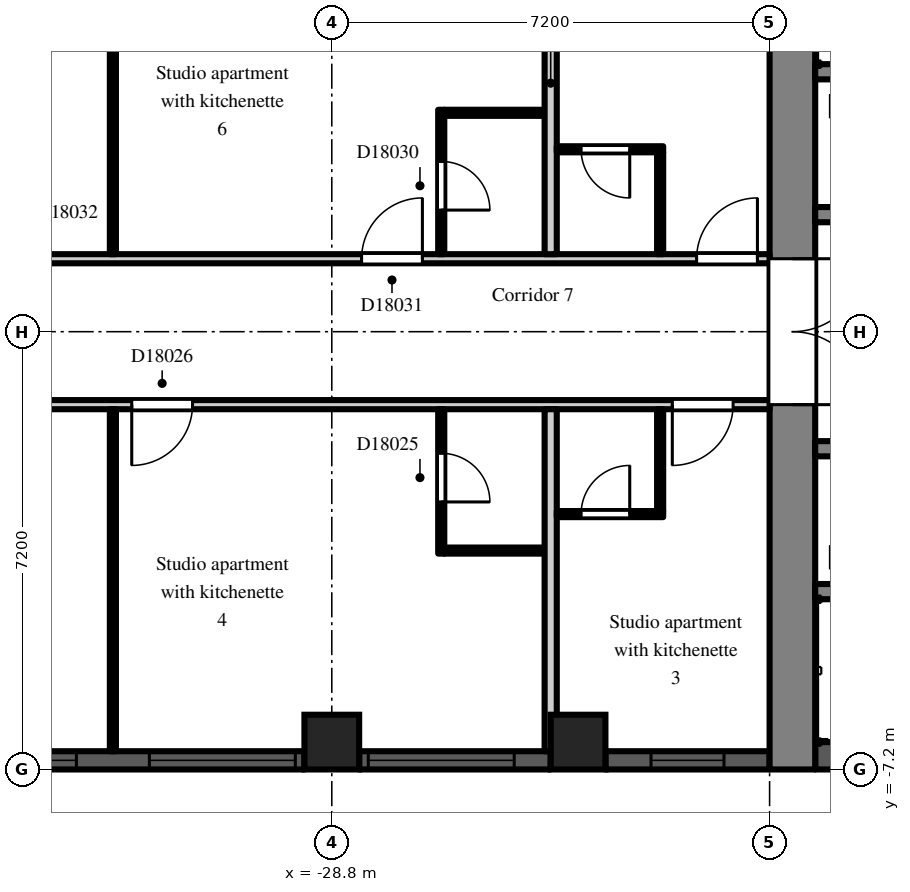
"""IFC4 building model, lengths in metres.
Left out: names, types, materials, properties, quantities, classifications, styles, units other than length and angle.
Written with IfcOpenShell. Run it as: python <this file> out.ifc"""

import sys

from ifc_helpers import new_model, si_unit, direction, frame, frame_2d, origin, origin_2d, place, context, subcontext, project, spatial, rectangle, extrude, element, fill, save


model = new_model("IFC4")
c1 = context("Model", 3, precision=1e-05, world=origin(), true_north=direction((0.0, 1.0)))
c2 = subcontext(c1, "Body", "Model", "MODEL_VIEW")
j1 = project(units=[si_unit("LENGTHUNIT", "METRE"), si_unit("PLANEANGLEUNIT", "RADIAN")], contexts=[c1])
p1 = place(None, origin())
s1 = spatial("IfcSite", under=j1, at=p1, CompositionType="ELEMENT")
p2 = place(p1, origin())
s2 = spatial("IfcBuilding", under=s1, at=p2, CompositionType="ELEMENT")
p3 = place(p2, frame((0.0, 0.0, 120.3)))
s3 = spatial("IfcBuildingStorey", under=s2, at=p3, CompositionType="ELEMENT", Elevation=120.3)
for number, where, z_axis, x_axis in (
    (1, (-28.8, -6.75, 0.0), (0.0, 0.0, 1.0), (1.0, 0.0, 0.0)),
    (2, (-24.75, -6.75, 0.0), (0.0, 0.0, 1.0), (1.0, 0.0, 0.0)),
):
    element("IfcColumn", number, at=place(p3, frame(where, z_axis=z_axis, x_axis=x_axis)), inside=s3, PredefinedType="COLUMN", context=c2, shape_type="SweptSolid", body=[
        extrude(rectangle(XDim=0.9, YDim=0.9, at=origin_2d()), origin(), (0.0, 0.0, 1.0), 3.0),
    ])
p4 = place(p3, frame((-35.55, -7.05, 0.0), z_axis=(0.0, 0.0, 1.0), x_axis=(1.0, 0.0, 0.0)))
e3 = element("IfcWall", 3, at=p4, inside=s3, PredefinedType="SOLIDWALL", context=c2, shape_type="SweptSolid", body=[
    extrude(rectangle(XDim=6.3, YDim=0.3, at=frame_2d((3.15, 0.0))), origin(), (0.0, 0.0, 1.0), 2.2),
])
p5 = place(p4, frame((0.15, 0.0, 0.2)))
e4 = element("IfcOpeningElement", 4, at=p5, cuts=e3, PredefinedType="OPENING", context=c2, shape_type="SweptSolid", body=[
    extrude(rectangle(XDim=2.4, YDim=1.85, at=frame_2d((1.2, 0.925))), frame((0.0, 0.16, 0.0), z_axis=(0.0, -1.0, 0.0), x_axis=(1.0, 0.0, 0.0)), (0.0, 0.0, 1.0), 0.32),
])
p6 = place(p4, frame((3.75, 0.0, 0.2)))
e5 = element("IfcOpeningElement", 5, at=p6, cuts=e3, PredefinedType="OPENING", context=c2, shape_type="SweptSolid", body=[
    extrude(rectangle(XDim=2.4, YDim=1.85, at=frame_2d((1.2, 0.925))), frame((0.0, 0.16, 0.0), z_axis=(0.0, -1.0, 0.0), x_axis=(1.0, 0.0, 0.0)), (0.0, 0.0, 1.0), 0.32),
])
p7 = place(p3, frame((-28.35, -7.05, 0.0), z_axis=(0.0, 0.0, 1.0), x_axis=(1.0, 0.0, 0.0)))
e6 = element("IfcWall", 6, at=p7, inside=s3, PredefinedType="SOLIDWALL", context=c2, shape_type="SweptSolid", body=[
    extrude(rectangle(XDim=3.15, YDim=0.3, at=frame_2d((1.575, 0.0))), origin(), (0.0, 0.0, 1.0), 2.2),
])
p8 = place(p7, frame((0.15, 0.0, 0.2)))
e7 = element("IfcOpeningElement", 7, at=p8, cuts=e6, PredefinedType="OPENING", context=c2, shape_type="SweptSolid", body=[
    extrude(rectangle(XDim=2.4, YDim=1.85, at=frame_2d((1.2, 0.925))), frame((0.0, 0.16, 0.0), z_axis=(0.0, -1.0, 0.0), x_axis=(1.0, 0.0, 0.0)), (0.0, 0.0, 1.0), 0.32),
])
p9 = place(p3, frame((-24.3, -7.05, 0.0), z_axis=(0.0, 0.0, 1.0), x_axis=(1.0, 0.0, 0.0)))
e8 = element("IfcWall", 8, at=p9, inside=s3, PredefinedType="SOLIDWALL", context=c2, shape_type="SweptSolid", body=[
    extrude(rectangle(XDim=2.7, YDim=0.3, at=frame_2d((1.35, 0.0))), origin(), (0.0, 0.0, 1.0), 2.2),
])
p10 = place(p9, frame((0.75, 0.0, 0.2)))
e9 = element("IfcOpeningElement", 9, at=p10, cuts=e8, PredefinedType="OPENING", context=c2, shape_type="SweptSolid", body=[
    extrude(rectangle(XDim=1.2, YDim=1.85, at=frame_2d((0.6, 0.925))), frame((0.0, 0.16, 0.0), z_axis=(0.0, -1.0, 0.0), x_axis=(1.0, 0.0, 0.0)), (0.0, 0.0, 1.0), 0.32),
])
p11 = place(p3, frame((-21.225, -7.2, 0.0), z_axis=(0.0, 0.0, 1.0), x_axis=(0.0, 1.0, 0.0)))
e10 = element("IfcWall", 10, at=p11, inside=s3, PredefinedType="SHEAR", context=c2, shape_type="SweptSolid", body=[
    extrude(rectangle(XDim=14.4, YDim=0.75, at=frame_2d((7.2, 0.0))), origin(), (0.0, 0.0, 1.0), 2.6),
])
p12 = place(p11, frame((6.0, 0.0, 0.0)))
e11 = element("IfcOpeningElement", 11, at=p12, cuts=e10, PredefinedType="OPENING", context=c2, shape_type="SweptSolid", body=[
    extrude(rectangle(XDim=2.4, YDim=2.2, at=frame_2d((1.2, 1.1))), frame((0.0, 0.385, 0.0), z_axis=(0.0, -1.0, 0.0), x_axis=(1.0, 0.0, 0.0)), (0.0, 0.0, 1.0), 0.77),
])
p13 = place(p3, frame((-7.9, 1.925, 0.0), z_axis=(0.0, 0.0, 1.0), x_axis=(-1.0, 0.0, 0.0)))
e12 = element("IfcWall", 12, at=p13, inside=s3, PredefinedType="SHEAR", context=c2, shape_type="SweptSolid", body=[
    extrude(rectangle(XDim=12.95, YDim=0.25, at=frame_2d((6.475, 0.0))), origin(), (0.0, 0.0, 1.0), 2.6),
])
p14 = place(p13, frame((4.825, 0.0, 0.0)))
e13 = element("IfcOpeningElement", 13, at=p14, cuts=e12, PredefinedType="OPENING", context=c2, shape_type="SweptSolid", body=[
    extrude(rectangle(XDim=1.1, YDim=2.1, at=frame_2d((0.55, 1.05))), frame((0.0, 0.135, 0.0), z_axis=(0.0, -1.0, 0.0), x_axis=(1.0, 0.0, 0.0)), (0.0, 0.0, 1.0), 0.27),
])
p15 = place(p13, frame((7.025, 0.0, 0.0)))
e14 = element("IfcOpeningElement", 14, at=p15, cuts=e12, PredefinedType="OPENING", context=c2, shape_type="SweptSolid", body=[
    extrude(rectangle(XDim=1.1, YDim=2.1, at=frame_2d((0.55, 1.05))), frame((0.0, 0.135, 0.0), z_axis=(0.0, -1.0, 0.0), x_axis=(1.0, 0.0, 0.0)), (0.0, 0.0, 1.0), 0.27),
])
p16 = place(p13, frame((9.225, 0.0, 0.0)))
e15 = element("IfcOpeningElement", 15, at=p16, cuts=e12, PredefinedType="OPENING", context=c2, shape_type="SweptSolid", body=[
    extrude(rectangle(XDim=1.1, YDim=2.1, at=frame_2d((0.55, 1.05))), frame((0.0, 0.135, 0.0), z_axis=(0.0, -1.0, 0.0), x_axis=(1.0, 0.0, 0.0)), (0.0, 0.0, 1.0), 0.27),
])
p17 = place(p13, frame((0.525, 0.0, 0.0)))
e16 = element("IfcOpeningElement", 16, at=p17, cuts=e12, PredefinedType="OPENING", context=c2, shape_type="SweptSolid", body=[
    extrude(rectangle(XDim=0.9, YDim=2.1, at=frame_2d((0.45, 1.05))), frame((0.0, 0.135, 0.0), z_axis=(0.0, -1.0, 0.0), x_axis=(1.0, 0.0, 0.0)), (0.0, 0.0, 1.0), 0.27),
])
p18 = place(p13, frame((2.625, 0.0, 0.0)))
e17 = element("IfcOpeningElement", 17, at=p18, cuts=e12, PredefinedType="OPENING", context=c2, shape_type="SweptSolid", body=[
    extrude(rectangle(XDim=1.1, YDim=2.1, at=frame_2d((0.55, 1.05))), frame((0.0, 0.135, 0.0), z_axis=(0.0, -1.0, 0.0), x_axis=(1.0, 0.0, 0.0)), (0.0, 0.0, 1.0), 0.27),
])
p19 = place(p3, frame((-12.3, 4.275, 0.0), z_axis=(0.0, 0.0, 1.0), x_axis=(-1.0, 0.0, 0.0)))
e18 = element("IfcWall", 18, at=p19, inside=s3, PredefinedType="SHEAR", context=c2, shape_type="SweptSolid", body=[
    extrude(rectangle(XDim=8.55, YDim=0.25, at=frame_2d((4.275, 0.0))), origin(), (0.0, 0.0, 1.0), 2.6),
])
p20 = place(p3, frame((-7.9, -6.975, 0.0), z_axis=(0.0, 0.0, 1.0), x_axis=(-1.0, 0.0, 0.0)))
e19 = element("IfcWall", 19, at=p20, inside=s3, PredefinedType="SHEAR", context=c2, shape_type="SweptSolid", body=[
    extrude(rectangle(XDim=12.95, YDim=0.45, at=frame_2d((6.475, 0.0))), origin(), (0.0, 0.0, 1.0), 2.6),
])
p21 = place(p3, frame((-7.9, -1.925, 0.0), z_axis=(0.0, 0.0, 1.0), x_axis=(-1.0, 0.0, 0.0)))
e20 = element("IfcWall", 20, at=p21, inside=s3, PredefinedType="SHEAR", context=c2, shape_type="SweptSolid", body=[
    extrude(rectangle(XDim=12.95, YDim=0.25, at=frame_2d((6.475, 0.0))), origin(), (0.0, 0.0, 1.0), 2.6),
])
p22 = place(p21, frame((0.525, 0.0, 0.0)))
e21 = element("IfcOpeningElement", 21, at=p22, cuts=e20, PredefinedType="OPENING", context=c2, shape_type="SweptSolid", body=[
    extrude(rectangle(XDim=0.9, YDim=2.1, at=frame_2d((0.45, 1.05))), frame((0.0, 0.135, 0.0), z_axis=(0.0, -1.0, 0.0), x_axis=(1.0, 0.0, 0.0)), (0.0, 0.0, 1.0), 0.27),
])
p23 = place(p21, frame((2.625, 0.0, 0.0)))
e22 = element("IfcOpeningElement", 22, at=p23, cuts=e20, PredefinedType="OPENING", context=c2, shape_type="SweptSolid", body=[
    extrude(rectangle(XDim=1.1, YDim=2.1, at=frame_2d((0.55, 1.05))), frame((0.0, 0.135, 0.0), z_axis=(0.0, -1.0, 0.0), x_axis=(1.0, 0.0, 0.0)), (0.0, 0.0, 1.0), 0.27),
])
p24 = place(p3, frame((-12.3, -4.275, 0.0), z_axis=(0.0, 0.0, 1.0), x_axis=(-1.0, 0.0, 0.0)))
e23 = element("IfcWall", 23, at=p24, inside=s3, PredefinedType="SHEAR", context=c2, shape_type="SweptSolid", body=[
    extrude(rectangle(XDim=8.55, YDim=0.25, at=frame_2d((4.275, 0.0))), origin(), (0.0, 0.0, 1.0), 2.6),
])
p25 = place(p3, frame((-36.5, -1.2, 0.0), z_axis=(0.0, 0.0, 1.0), x_axis=(1.0, 0.0, 0.0)))
e24 = element("IfcWall", 24, at=p25, inside=s3, PredefinedType="PARTITIONING", context=c2, shape_type="SweptSolid", body=[
    extrude(rectangle(XDim=14.9, YDim=0.15, at=frame_2d((7.45, 0.0))), origin(), (0.0, 0.0, 1.0), 2.6),
])
p26 = place(p25, frame((13.3, 0.0, 0.0)))
e25 = element("IfcOpeningElement", 25, at=p26, cuts=e24, PredefinedType="OPENING", context=c2, shape_type="SweptSolid", body=[
    extrude(rectangle(XDim=1.0, YDim=2.1, at=frame_2d((0.5, 1.05))), frame((0.0, 0.085, 0.0), z_axis=(0.0, -1.0, 0.0), x_axis=(1.0, 0.0, 0.0)), (0.0, 0.0, 1.0), 0.17),
])
p27 = place(p25, frame((4.41, 0.0, 0.0)))
e26 = element("IfcOpeningElement", 26, at=p27, cuts=e24, PredefinedType="OPENING", context=c2, shape_type="SweptSolid", body=[
    extrude(rectangle(XDim=1.0, YDim=2.1, at=frame_2d((0.5, 1.05))), frame((0.0, 0.085, 0.0), z_axis=(0.0, -1.0, 0.0), x_axis=(1.0, 0.0, 0.0)), (0.0, 0.0, 1.0), 0.17),
])
p28 = place(p25, frame((1.15, 0.0, 0.0)))
e27 = element("IfcOpeningElement", 27, at=p28, cuts=e24, PredefinedType="OPENING", context=c2, shape_type="SweptSolid", body=[
    extrude(rectangle(XDim=1.8, YDim=2.1, at=frame_2d((0.9, 1.05))), frame((0.0, 0.085, 0.0), z_axis=(0.0, -1.0, 0.0), x_axis=(1.0, 0.0, 0.0)), (0.0, 0.0, 1.0), 0.17),
])
p29 = place(p3, frame((-36.5, 1.2, 0.0), z_axis=(0.0, 0.0, 1.0), x_axis=(1.0, 0.0, 0.0)))
e28 = element("IfcWall", 28, at=p29, inside=s3, PredefinedType="PARTITIONING", context=c2, shape_type="SweptSolid", body=[
    extrude(rectangle(XDim=14.9, YDim=0.15, at=frame_2d((7.45, 0.0))), origin(), (0.0, 0.0, 1.0), 2.6),
])
p30 = place(p29, frame((13.7, 0.0, 0.0)))
e29 = element("IfcOpeningElement", 29, at=p30, cuts=e28, PredefinedType="OPENING", context=c2, shape_type="SweptSolid", body=[
    extrude(rectangle(XDim=1.0, YDim=2.1, at=frame_2d((0.5, 1.05))), frame((0.0, 0.085, 0.0), z_axis=(0.0, -1.0, 0.0), x_axis=(1.0, 0.0, 0.0)), (0.0, 0.0, 1.0), 0.17),
])
p31 = place(p29, frame((8.19, 0.0, 0.0)))
e30 = element("IfcOpeningElement", 30, at=p31, cuts=e28, PredefinedType="OPENING", context=c2, shape_type="SweptSolid", body=[
    extrude(rectangle(XDim=1.0, YDim=2.1, at=frame_2d((0.5, 1.05))), frame((0.0, 0.085, 0.0), z_axis=(0.0, -1.0, 0.0), x_axis=(1.0, 0.0, 0.0)), (0.0, 0.0, 1.0), 0.17),
])
p32 = place(p29, frame((1.15, 0.0, 0.0)))
e31 = element("IfcOpeningElement", 31, at=p32, cuts=e28, PredefinedType="OPENING", context=c2, shape_type="SweptSolid", body=[
    extrude(rectangle(XDim=1.8, YDim=2.1, at=frame_2d((0.9, 1.05))), frame((0.0, 0.085, 0.0), z_axis=(0.0, -1.0, 0.0), x_axis=(1.0, 0.0, 0.0)), (0.0, 0.0, 1.0), 0.17),
])
for number, where, z_axis, x_axis in (
    (32, (-32.4, -6.9, 0.0), (0.0, 0.0, 1.0), (0.0, 1.0, 0.0)),
    (33, (-32.4, 1.275, 0.0), (0.0, 0.0, 1.0), (0.0, 1.0, 0.0)),
):
    element("IfcWall", number, at=place(p3, frame(where, z_axis=z_axis, x_axis=x_axis)), inside=s3, PredefinedType="PARTITIONING", context=c2, shape_type="SweptSolid", body=[
        extrude(rectangle(XDim=5.625, YDim=0.1, at=frame_2d((2.812, 0.0))), origin(), (0.0, 0.0, 1.0), 2.6),
    ])
p33 = place(p3, frame((-27.0, -3.65, 0.0), z_axis=(0.0, 0.0, 1.0), x_axis=(0.0, 1.0, 0.0)))
e34 = element("IfcWall", 34, at=p33, inside=s3, PredefinedType="PARTITIONING", context=c2, shape_type="SweptSolid", body=[
    extrude(rectangle(XDim=2.375, YDim=0.1, at=frame_2d((1.188, 0.0))), origin(), (0.0, 0.0, 1.0), 2.6),
])
p34 = place(p33, frame((0.85, 0.0, 0.0)))
e35 = element("IfcOpeningElement", 35, at=p34, cuts=e34, PredefinedType="OPENING", context=c2, shape_type="SweptSolid", body=[
    extrude(rectangle(XDim=0.8, YDim=2.1, at=frame_2d((0.4, 1.05))), frame((0.0, 0.06, 0.0), z_axis=(0.0, -1.0, 0.0), x_axis=(1.0, 0.0, 0.0)), (0.0, 0.0, 1.0), 0.12),
])
p35 = place(p3, frame((-26.95, -3.6, 0.0), z_axis=(0.0, 0.0, 1.0), x_axis=(1.0, 0.0, 0.0)))
e36 = element("IfcWall", 36, at=p35, inside=s3, PredefinedType="PARTITIONING", context=c2, shape_type="SweptSolid", body=[
    extrude(rectangle(XDim=1.65, YDim=0.1, at=frame_2d((0.825, 0.0))), origin(), (0.0, 0.0, 1.0), 2.6),
])
p36 = place(p3, frame((-27.0, 1.275, 0.0), z_axis=(0.0, 0.0, 1.0), x_axis=(0.0, 1.0, 0.0)))
e37 = element("IfcWall", 37, at=p36, inside=s3, PredefinedType="PARTITIONING", context=c2, shape_type="SweptSolid", body=[
    extrude(rectangle(XDim=2.375, YDim=0.1, at=frame_2d((1.188, 0.0))), origin(), (0.0, 0.0, 1.0), 2.6),
])
p37 = place(p36, frame((0.725, 0.0, 0.0)))
e38 = element("IfcOpeningElement", 38, at=p37, cuts=e37, PredefinedType="OPENING", context=c2, shape_type="SweptSolid", body=[
    extrude(rectangle(XDim=0.8, YDim=2.1, at=frame_2d((0.4, 1.05))), frame((0.0, 0.06, 0.0), z_axis=(0.0, -1.0, 0.0), x_axis=(1.0, 0.0, 0.0)), (0.0, 0.0, 1.0), 0.12),
])
p38 = place(p3, frame((-26.95, 3.6, 0.0), z_axis=(0.0, 0.0, 1.0), x_axis=(1.0, 0.0, 0.0)))
e39 = element("IfcWall", 39, at=p38, inside=s3, PredefinedType="PARTITIONING", context=c2, shape_type="SweptSolid", body=[
    extrude(rectangle(XDim=1.65, YDim=0.1, at=frame_2d((0.825, 0.0))), origin(), (0.0, 0.0, 1.0), 2.6),
])
p39 = place(p3, frame((-25.2, -6.9, 0.0), z_axis=(0.0, 0.0, 1.0), x_axis=(0.0, 1.0, 0.0)))
e40 = element("IfcWall", 40, at=p39, inside=s3, PredefinedType="PARTITIONING", context=c2, shape_type="SweptSolid", body=[
    extrude(rectangle(XDim=5.625, YDim=0.2, at=frame_2d((2.812, 0.0))), origin(), (0.0, 0.0, 1.0), 2.6),
])
p40 = place(p3, frame((-25.1, -3.0, 0.0), z_axis=(0.0, 0.0, 1.0), x_axis=(1.0, 0.0, 0.0)))
e41 = element("IfcWall", 41, at=p40, inside=s3, PredefinedType="PARTITIONING", context=c2, shape_type="SweptSolid", body=[
    extrude(rectangle(XDim=1.75, YDim=0.1, at=frame_2d((0.875, 0.0))), origin(), (0.0, 0.0, 1.0), 2.6),
])
p41 = place(p40, frame((0.4, 0.0, 0.0)))
e42 = element("IfcOpeningElement", 42, at=p41, cuts=e41, PredefinedType="OPENING", context=c2, shape_type="SweptSolid", body=[
    extrude(rectangle(XDim=0.8, YDim=2.1, at=frame_2d((0.4, 1.05))), frame((0.0, 0.06, 0.0), z_axis=(0.0, -1.0, 0.0), x_axis=(1.0, 0.0, 0.0)), (0.0, 0.0, 1.0), 0.12),
])
p42 = place(p3, frame((-25.2, 1.275, 0.0), z_axis=(0.0, 0.0, 1.0), x_axis=(0.0, 1.0, 0.0)))
e43 = element("IfcWall", 43, at=p42, inside=s3, PredefinedType="PARTITIONING", context=c2, shape_type="SweptSolid", body=[
    extrude(rectangle(XDim=5.625, YDim=0.2, at=frame_2d((2.812, 0.0))), origin(), (0.0, 0.0, 1.0), 2.6),
])
p43 = place(p3, frame((-25.1, 3.0, 0.0), z_axis=(0.0, 0.0, 1.0), x_axis=(1.0, 0.0, 0.0)))
e44 = element("IfcWall", 44, at=p43, inside=s3, PredefinedType="PARTITIONING", context=c2, shape_type="SweptSolid", body=[
    extrude(rectangle(XDim=1.75, YDim=0.1, at=frame_2d((0.875, 0.0))), origin(), (0.0, 0.0, 1.0), 2.6),
])
p44 = place(p43, frame((0.4, 0.0, 0.0)))
e45 = element("IfcOpeningElement", 45, at=p44, cuts=e44, PredefinedType="OPENING", context=c2, shape_type="SweptSolid", body=[
    extrude(rectangle(XDim=0.8, YDim=2.1, at=frame_2d((0.4, 1.05))), frame((0.0, 0.06, 0.0), z_axis=(0.0, -1.0, 0.0), x_axis=(1.0, 0.0, 0.0)), (0.0, 0.0, 1.0), 0.12),
])
for number, where, z_axis, x_axis in (
    (46, (-23.4, -2.95, 0.0), (0.0, 0.0, 1.0), (0.0, 1.0, 0.0)),
    (47, (-23.4, 1.275, 0.0), (0.0, 0.0, 1.0), (0.0, 1.0, 0.0)),
):
    element("IfcWall", number, at=place(p3, frame(where, z_axis=z_axis, x_axis=x_axis)), inside=s3, PredefinedType="PARTITIONING", context=c2, shape_type="SweptSolid", body=[
        extrude(rectangle(XDim=1.675, YDim=0.1, at=frame_2d((0.837, 0.0))), origin(), (0.0, 0.0, 1.0), 2.6),
    ])
p45 = place(p5, origin())
e48 = element("IfcWindow", 48, at=p45, inside=s3, PartitioningType="SINGLE_PANEL", PredefinedType="WINDOW", context=c2, shape_type="SweptSolid", body=[
    extrude(rectangle(XDim=2.4, YDim=1.85, at=frame_2d((1.2, 0.925))), frame((0.0, 0.03, 0.0), z_axis=(0.0, -1.0, 0.0), x_axis=(1.0, 0.0, 0.0)), (0.0, 0.0, 1.0), 0.06),
])
fill(e4, e48)
p46 = place(p6, origin())
e49 = element("IfcWindow", 49, at=p46, inside=s3, PartitioningType="SINGLE_PANEL", PredefinedType="WINDOW", context=c2, shape_type="SweptSolid", body=[
    extrude(rectangle(XDim=2.4, YDim=1.85, at=frame_2d((1.2, 0.925))), frame((0.0, 0.03, 0.0), z_axis=(0.0, -1.0, 0.0), x_axis=(1.0, 0.0, 0.0)), (0.0, 0.0, 1.0), 0.06),
])
fill(e5, e49)
p47 = place(p8, origin())
e50 = element("IfcWindow", 50, at=p47, inside=s3, PartitioningType="SINGLE_PANEL", PredefinedType="WINDOW", context=c2, shape_type="SweptSolid", body=[
    extrude(rectangle(XDim=2.4, YDim=1.85, at=frame_2d((1.2, 0.925))), frame((0.0, 0.03, 0.0), z_axis=(0.0, -1.0, 0.0), x_axis=(1.0, 0.0, 0.0)), (0.0, 0.0, 1.0), 0.06),
])
fill(e7, e50)
p48 = place(p10, origin())
e51 = element("IfcWindow", 51, at=p48, inside=s3, PartitioningType="SINGLE_PANEL", PredefinedType="WINDOW", context=c2, shape_type="SweptSolid", body=[
    extrude(rectangle(XDim=1.2, YDim=1.85, at=frame_2d((0.6, 0.925))), frame((0.0, 0.03, 0.0), z_axis=(0.0, -1.0, 0.0), x_axis=(1.0, 0.0, 0.0)), (0.0, 0.0, 1.0), 0.06),
])
fill(e9, e51)
p49 = place(p12, frame((2.4, 0.0, 0.0), z_axis=(0.0, 0.0, 1.0), x_axis=(-1.0, 0.0, 0.0)))
e52 = element("IfcDoor", 52, at=p49, inside=s3, OperationType="DOUBLE_DOOR_DOUBLE_SWING", PredefinedType="DOOR", context=c2, shape_type="SweptSolid", body=[
    extrude(rectangle(XDim=2.4, YDim=2.2, at=frame_2d((1.2, 1.1))), frame((0.0, 0.025, 0.0), z_axis=(0.0, -1.0, 0.0), x_axis=(1.0, 0.0, 0.0)), (0.0, 0.0, 1.0), 0.05),
])
fill(e11, e52)
p50 = place(p41, origin())
e53 = element("IfcDoor", 53, at=p50, inside=s3, OperationType="SINGLE_SWING_RIGHT", PredefinedType="DOOR", context=c2, shape_type="SweptSolid", body=[
    extrude(rectangle(XDim=0.8, YDim=2.1, at=frame_2d((0.4, 1.05))), frame((0.0, 0.025, 0.0), z_axis=(0.0, -1.0, 0.0), x_axis=(1.0, 0.0, 0.0)), (0.0, 0.0, 1.0), 0.05),
])
fill(e42, e53)
p51 = place(p26, frame((1.0, 0.0, 0.0), z_axis=(0.0, 0.0, 1.0), x_axis=(-1.0, 0.0, 0.0)))
e54 = element("IfcDoor", 54, at=p51, inside=s3, OperationType="SINGLE_SWING_RIGHT", PredefinedType="DOOR", context=c2, shape_type="SweptSolid", body=[
    extrude(rectangle(XDim=1.0, YDim=2.1, at=frame_2d((0.5, 1.05))), frame((0.0, 0.025, 0.0), z_axis=(0.0, -1.0, 0.0), x_axis=(1.0, 0.0, 0.0)), (0.0, 0.0, 1.0), 0.05),
])
fill(e25, e54)
p52 = place(p34, frame((0.8, 0.0, 0.0), z_axis=(0.0, 0.0, 1.0), x_axis=(-1.0, 0.0, 0.0)))
e55 = element("IfcDoor", 55, at=p52, inside=s3, OperationType="SINGLE_SWING_RIGHT", PredefinedType="DOOR", context=c2, shape_type="SweptSolid", body=[
    extrude(rectangle(XDim=0.8, YDim=2.1, at=frame_2d((0.4, 1.05))), frame((0.0, 0.025, 0.0), z_axis=(0.0, -1.0, 0.0), x_axis=(1.0, 0.0, 0.0)), (0.0, 0.0, 1.0), 0.05),
])
fill(e35, e55)
p53 = place(p27, frame((1.0, 0.0, 0.0), z_axis=(0.0, 0.0, 1.0), x_axis=(-1.0, 0.0, 0.0)))
e56 = element("IfcDoor", 56, at=p53, inside=s3, OperationType="SINGLE_SWING_RIGHT", PredefinedType="DOOR", context=c2, shape_type="SweptSolid", body=[
    extrude(rectangle(XDim=1.0, YDim=2.1, at=frame_2d((0.5, 1.05))), frame((0.0, 0.025, 0.0), z_axis=(0.0, -1.0, 0.0), x_axis=(1.0, 0.0, 0.0)), (0.0, 0.0, 1.0), 0.05),
])
fill(e26, e56)
p54 = place(p44, frame((0.8, 0.0, 0.0), z_axis=(0.0, 0.0, 1.0), x_axis=(-1.0, 0.0, 0.0)))
e57 = element("IfcDoor", 57, at=p54, inside=s3, OperationType="SINGLE_SWING_LEFT", PredefinedType="DOOR", context=c2, shape_type="SweptSolid", body=[
    extrude(rectangle(XDim=0.8, YDim=2.1, at=frame_2d((0.4, 1.05))), frame((0.0, 0.025, 0.0), z_axis=(0.0, -1.0, 0.0), x_axis=(1.0, 0.0, 0.0)), (0.0, 0.0, 1.0), 0.05),
])
fill(e45, e57)
p55 = place(p30, origin())
e58 = element("IfcDoor", 58, at=p55, inside=s3, OperationType="SINGLE_SWING_RIGHT", PredefinedType="DOOR", context=c2, shape_type="SweptSolid", body=[
    extrude(rectangle(XDim=1.0, YDim=2.1, at=frame_2d((0.5, 1.05))), frame((0.0, 0.025, 0.0), z_axis=(0.0, -1.0, 0.0), x_axis=(1.0, 0.0, 0.0)), (0.0, 0.0, 1.0), 0.05),
])
fill(e29, e58)
p56 = place(p37, frame((0.8, 0.0, 0.0), z_axis=(0.0, 0.0, 1.0), x_axis=(-1.0, 0.0, 0.0)))
e59 = element("IfcDoor", 59, at=p56, inside=s3, OperationType="SINGLE_SWING_RIGHT", PredefinedType="DOOR", context=c2, shape_type="SweptSolid", body=[
    extrude(rectangle(XDim=0.8, YDim=2.1, at=frame_2d((0.4, 1.05))), frame((0.0, 0.025, 0.0), z_axis=(0.0, -1.0, 0.0), x_axis=(1.0, 0.0, 0.0)), (0.0, 0.0, 1.0), 0.05),
])
fill(e38, e59)
p57 = place(p31, origin())
e60 = element("IfcDoor", 60, at=p57, inside=s3, OperationType="SINGLE_SWING_RIGHT", PredefinedType="DOOR", context=c2, shape_type="SweptSolid", body=[
    extrude(rectangle(XDim=1.0, YDim=2.1, at=frame_2d((0.5, 1.05))), frame((0.0, 0.025, 0.0), z_axis=(0.0, -1.0, 0.0), x_axis=(1.0, 0.0, 0.0)), (0.0, 0.0, 1.0), 0.05),
])
fill(e30, e60)
save(model, sys.argv[1])
